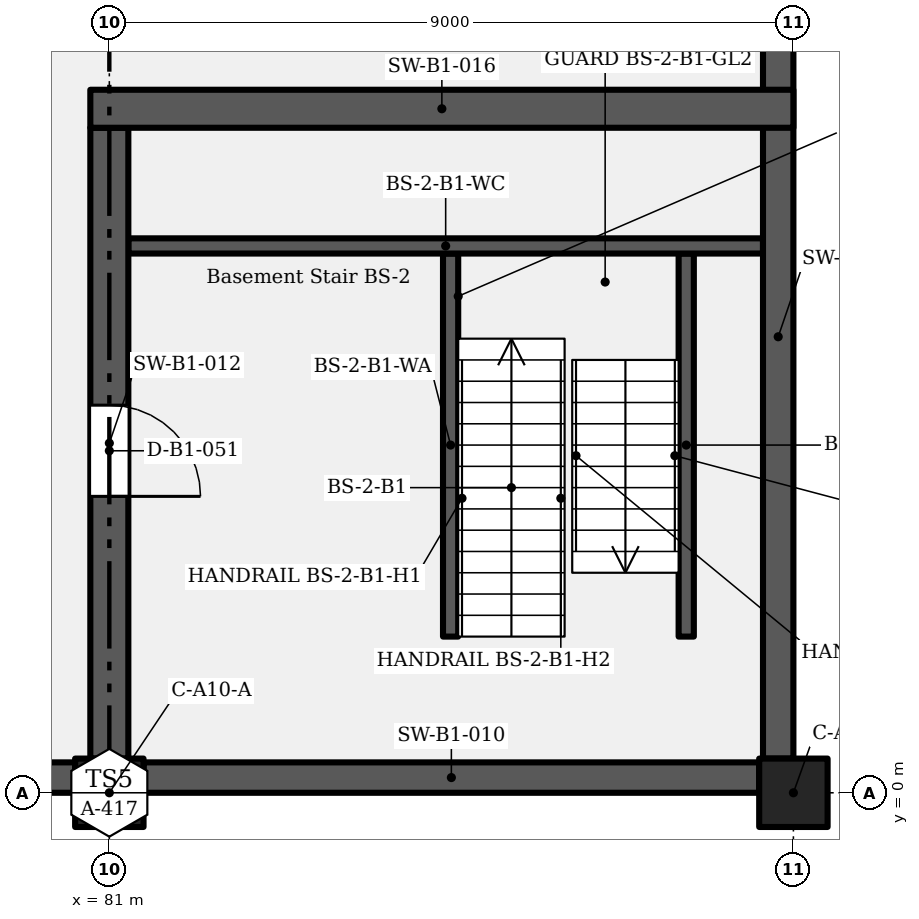
"""IFC4 building model, lengths in metres.
Left out: names, types, materials, properties, quantities, classifications, styles, units other than length and angle.
Written with IfcOpenShell. Run it as: python <this file> out.ifc"""

import sys

from ifc_helpers import new_model, si_unit, direction, frame, frame_2d, origin, origin_2d, place, context, subcontext, project, spatial, rectangle, extrude, element, fill, save


model = new_model("IFC4")
c1 = context("Model", 3, precision=1e-05, world=origin(), true_north=direction((0.0, 1.0)))
c2 = subcontext(c1, "Body", "Model", "MODEL_VIEW")
j1 = project(units=[si_unit("LENGTHUNIT", "METRE"), si_unit("PLANEANGLEUNIT", "RADIAN")], contexts=[c1])
p1 = place(None, origin())
s1 = spatial("IfcSite", under=j1, at=p1, CompositionType="ELEMENT")
p2 = place(p1, origin())
s2 = spatial("IfcBuilding", under=s1, at=p2, CompositionType="ELEMENT")
p3 = place(p2, frame((0.0, 0.0, -4.2)))
s3 = spatial("IfcBuildingStorey", under=s2, at=p3, CompositionType="ELEMENT", Elevation=-4.2)
for number, where, z_axis, x_axis in (
    (1, (81.0, 0.0, 0.0), (0.0, 0.0, 1.0), (1.0, 0.0, 0.0)),
    (2, (90.0, 0.0, 0.0), (0.0, 0.0, 1.0), (1.0, 0.0, 0.0)),
):
    element("IfcColumn", number, at=place(p3, frame(where, z_axis=z_axis, x_axis=x_axis)), inside=s3, PredefinedType="COLUMN", context=c2, shape_type="SweptSolid", body=[
        extrude(rectangle(XDim=0.9, YDim=0.9, at=origin_2d()), origin(), (0.0, 0.0, 1.0), 4.2),
    ])
for number, where, z_axis, x_axis in (
    (3, (72.45, 0.2, 0.0), (0.0, 0.0, 1.0), (1.0, 0.0, 0.0)),
    (4, (81.45, 0.2, 0.0), (0.0, 0.0, 1.0), (1.0, 0.0, 0.0)),
):
    element("IfcWall", number, at=place(p3, frame(where, z_axis=z_axis, x_axis=x_axis)), inside=s3, PredefinedType="SOLIDWALL", context=c2, shape_type="SweptSolid", body=[
        extrude(rectangle(XDim=8.1, YDim=0.4, at=frame_2d((4.05, 0.0))), origin(), (0.0, 0.0, 1.0), 3.9),
    ])
p4 = place(p3, frame((81.0, 0.45, 0.0), z_axis=(0.0, 0.0, 1.0), x_axis=(0.0, 1.0, 0.0)))
e5 = element("IfcWall", 5, at=p4, inside=s3, PredefinedType="SHEAR", context=c2, shape_type="SweptSolid", body=[
    extrude(rectangle(XDim=8.3, YDim=0.5, at=frame_2d((4.15, 0.0))), origin(), (0.0, 0.0, 1.0), 3.9),
])
p5 = place(p4, frame((4.65, 0.0, 0.0), z_axis=(0.0, 0.0, 1.0), x_axis=(-1.0, 0.0, 0.0)))
e6 = element("IfcOpeningElement", 6, at=p5, cuts=e5, PredefinedType="OPENING", context=c2, shape_type="SweptSolid", body=[
    extrude(rectangle(XDim=1.2, YDim=2.1, at=frame_2d((0.6, 1.05))), frame((0.0, 0.26, 0.0), z_axis=(0.0, -1.0, 0.0), x_axis=(1.0, 0.0, 0.0)), (0.0, 0.0, 1.0), 0.52),
])
p6 = place(p3, frame((89.8, 0.45, 0.0), z_axis=(0.0, 0.0, 1.0), x_axis=(0.0, 1.0, 0.0)))
e7 = element("IfcWall", 7, at=p6, inside=s3, PredefinedType="SOLIDWALL", context=c2, shape_type="SweptSolid", body=[
    extrude(rectangle(XDim=11.1, YDim=0.4, at=frame_2d((5.55, 0.0))), origin(), (0.0, 0.0, 1.0), 3.9),
])
p7 = place(p3, frame((80.75, 9.0, 0.0), z_axis=(0.0, 0.0, 1.0), x_axis=(1.0, 0.0, 0.0)))
e8 = element("IfcWall", 8, at=p7, inside=s3, PredefinedType="SHEAR", context=c2, shape_type="SweptSolid", body=[
    extrude(rectangle(XDim=9.25, YDim=0.5, at=frame_2d((4.625, 0.0))), origin(), (0.0, 0.0, 1.0), 3.9),
])
for number, where, z_axis, x_axis in (
    (9, (85.49, 2.055, 0.0), (0.0, 0.0, 1.0), (0.0, 1.0, 0.0)),
    (10, (88.59, 2.055, 0.0), (0.0, 0.0, 1.0), (0.0, 1.0, 0.0)),
):
    element("IfcWall", number, at=place(p3, frame(where, z_axis=z_axis, x_axis=x_axis)), inside=s3, PredefinedType="SHEAR", context=c2, shape_type="SweptSolid", body=[
        extrude(rectangle(XDim=5.04, YDim=0.2, at=frame_2d((2.52, 0.0))), origin(), (0.0, 0.0, 1.0), 3.9),
    ])
p8 = place(p3, frame((81.25, 7.195, 0.0), z_axis=(0.0, 0.0, 1.0), x_axis=(1.0, 0.0, 0.0)))
e11 = element("IfcWall", 11, at=p8, inside=s3, PredefinedType="SHEAR", context=c2, shape_type="SweptSolid", body=[
    extrude(rectangle(XDim=8.35, YDim=0.2, at=frame_2d((4.175, 0.0))), origin(), (0.0, 0.0, 1.0), 3.9),
])
p9 = place(p5, origin())
e12 = element("IfcDoor", 12, at=p9, inside=s3, OperationType="SINGLE_SWING_RIGHT", PredefinedType="DOOR", context=c2, shape_type="SweptSolid", body=[
    extrude(rectangle(XDim=1.2, YDim=2.1, at=frame_2d((0.6, 1.05))), frame((0.0, 0.025, 0.0), z_axis=(0.0, -1.0, 0.0), x_axis=(1.0, 0.0, 0.0)), (0.0, 0.0, 1.0), 0.05),
])
fill(e6, e12)
save(model, sys.argv[1])
